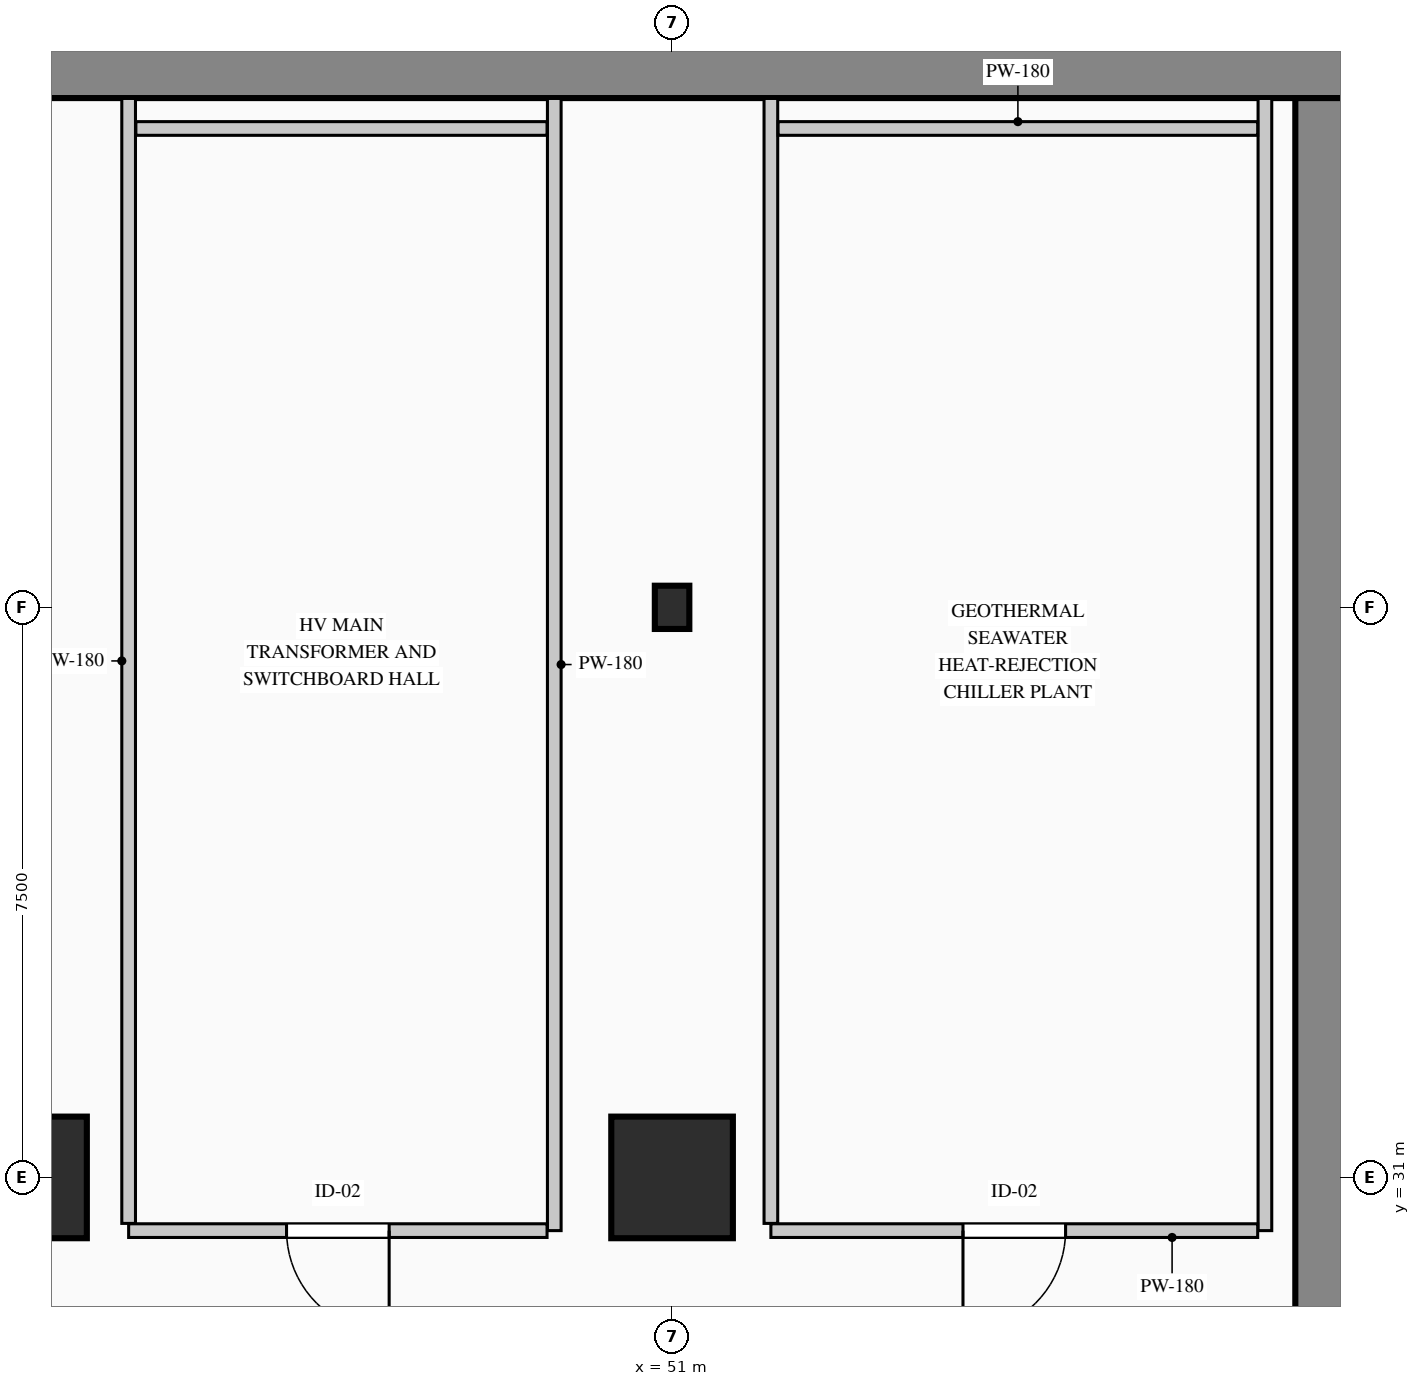
"""IFC4 building model, lengths in metres.
Left out: names, types, materials, properties, quantities, classifications, styles, units other than length and angle.
Written with IfcOpenShell. Run it as: python <this file> out.ifc"""

import sys

from ifc_helpers import new_model, si_unit, direction, frame, frame_2d, origin, origin_2d, place, context, subcontext, project, spatial, rectangle, i_section, extrude, element, fill, save


model = new_model("IFC4")
c1 = context("Model", 3, precision=1e-05, world=origin(), true_north=direction((0.0, 1.0)))
c2 = subcontext(c1, "Body", "Model", "MODEL_VIEW")
j1 = project(units=[si_unit("LENGTHUNIT", "METRE"), si_unit("PLANEANGLEUNIT", "RADIAN")], contexts=[c1])
p1 = place(None, origin())
s1 = spatial("IfcSite", under=j1, at=p1, CompositionType="ELEMENT")
p2 = place(p1, origin())
s2 = spatial("IfcBuilding", under=s1, at=p2, CompositionType="ELEMENT")
p3 = place(p2, frame((0.0, 0.0, -18.0)))
s3 = spatial("IfcBuildingStorey", under=s2, at=p3, CompositionType="ELEMENT", Elevation=-18.0)
p4 = place(p3, frame((0.0, 45.6, 0.0), z_axis=(0.0, 0.0, 1.0), x_axis=(1.0, 0.0, 0.0)))
e1 = element("IfcWall", 1, at=p4, inside=s3, PredefinedType="USERDEFINED", context=c2, shape_type="SweptSolid", body=[
    extrude(rectangle(XDim=60.0, YDim=0.8, at=frame_2d((30.0, 0.0))), origin(), (0.0, 0.0, 1.0), 4.5),
])
p5 = place(p3, frame((59.6, 0.8, 0.0), z_axis=(0.0, 0.0, 1.0), x_axis=(0.0, 1.0, 0.0)))
e2 = element("IfcWall", 2, at=p5, inside=s3, PredefinedType="USERDEFINED", context=c2, shape_type="SweptSolid", body=[
    extrude(rectangle(XDim=44.4, YDim=0.8, at=frame_2d((22.2, 0.0))), origin(), (0.0, 0.0, 1.0), 4.5),
])
for number, where, z_axis, x_axis in (
    (3, (42.5, 31.0, 0.0), (0.0, 0.0, 1.0), (1.0, 0.0, 0.0)),
    (4, (51.0, 31.0, 0.0), (0.0, 0.0, 1.0), (1.0, 0.0, 0.0)),
):
    element("IfcColumn", number, at=place(p3, frame(where, z_axis=z_axis, x_axis=x_axis)), inside=s3, PredefinedType="COLUMN", context=c2, shape_type="SweptSolid", body=[
        extrude(rectangle(XDim=1.6, YDim=1.6, at=origin_2d()), origin(), (0.0, 0.0, 1.0), 4.5),
    ])
p6 = place(p3, frame((51.0, 38.5, 0.0), z_axis=(0.0, 0.0, 1.0), x_axis=(1.0, 0.0, 0.0)))
e5 = element("IfcColumn", 5, at=p6, inside=s3, PredefinedType="COLUMN", context=c2, shape_type="SweptSolid", body=[
    extrude(i_section(OverallWidth=0.454, OverallDepth=0.569, WebThickness=0.078, FlangeThickness=0.08, FilletRadius=0.015, at=origin_2d()), origin(), (0.0, 0.0, 1.0), 4.5),
])
p7 = place(p3, frame((58.8, 45.195, 0.0), z_axis=(0.0, 0.0, 1.0), x_axis=(0.0, -1.0, 0.0)))
e6 = element("IfcWall", 6, at=p7, inside=s3, PredefinedType="PARTITIONING", context=c2, shape_type="SweptSolid", body=[
    extrude(rectangle(XDim=14.895, YDim=0.18, at=frame_2d((7.448, 0.0))), origin(), (0.0, 0.0, 1.0), 4.135),
])
p8 = place(p3, frame((58.705, 30.3, 0.0), z_axis=(0.0, 0.0, 1.0), x_axis=(-1.0, 0.0, 0.0)))
e7 = element("IfcWall", 7, at=p8, inside=s3, PredefinedType="PARTITIONING", context=c2, shape_type="SweptSolid", body=[
    extrude(rectangle(XDim=6.405, YDim=0.18, at=frame_2d((3.203, 0.0))), origin(), (0.0, 0.0, 1.0), 3.52),
])
p9 = place(p8, frame((2.528, 0.0, 0.0)))
e8 = element("IfcOpeningElement", 8, at=p9, cuts=e7, PredefinedType="OPENING", context=c2, shape_type="SweptSolid", body=[
    extrude(rectangle(XDim=1.35, YDim=2.2, at=frame_2d((0.675, 1.1))), frame((0.0, 0.1, 0.0), z_axis=(0.0, -1.0, 0.0), x_axis=(1.0, 0.0, 0.0)), (0.0, 0.0, 1.0), 0.2),
])
p10 = place(p3, frame((52.3, 30.395, 0.0), z_axis=(0.0, 0.0, 1.0), x_axis=(0.0, 1.0, 0.0)))
e9 = element("IfcWall", 9, at=p10, inside=s3, PredefinedType="PARTITIONING", context=c2, shape_type="SweptSolid", body=[
    extrude(rectangle(XDim=14.8, YDim=0.18, at=frame_2d((7.4, 0.0))), origin(), (0.0, 0.0, 1.0), 4.135),
])
p11 = place(p3, frame((52.395, 44.8, 0.0), z_axis=(0.0, 0.0, 1.0), x_axis=(1.0, 0.0, 0.0)))
e10 = element("IfcWall", 10, at=p11, inside=s3, PredefinedType="PARTITIONING", context=c2, shape_type="SweptSolid", body=[
    extrude(rectangle(XDim=6.31, YDim=0.18, at=frame_2d((3.155, 0.0))), origin(), (0.0, 0.0, 1.0), 4.135),
])
p12 = place(p3, frame((49.45, 45.195, 0.0), z_axis=(0.0, 0.0, 1.0), x_axis=(0.0, -1.0, 0.0)))
e11 = element("IfcWall", 11, at=p12, inside=s3, PredefinedType="PARTITIONING", context=c2, shape_type="SweptSolid", body=[
    extrude(rectangle(XDim=14.895, YDim=0.18, at=frame_2d((7.448, 0.0))), origin(), (0.0, 0.0, 1.0), 3.52),
])
p13 = place(p3, frame((49.355, 30.3, 0.0), z_axis=(0.0, 0.0, 1.0), x_axis=(-1.0, 0.0, 0.0)))
e12 = element("IfcWall", 12, at=p13, inside=s3, PredefinedType="PARTITIONING", context=c2, shape_type="SweptSolid", body=[
    extrude(rectangle(XDim=5.505, YDim=0.18, at=frame_2d((2.752, 0.0))), origin(), (0.0, 0.0, 1.0), 4.135),
])
p14 = place(p13, frame((2.077, 0.0, 0.0)))
e13 = element("IfcOpeningElement", 13, at=p14, cuts=e12, PredefinedType="OPENING", context=c2, shape_type="SweptSolid", body=[
    extrude(rectangle(XDim=1.35, YDim=2.2, at=frame_2d((0.675, 1.1))), frame((0.0, 0.1, 0.0), z_axis=(0.0, -1.0, 0.0), x_axis=(1.0, 0.0, 0.0)), (0.0, 0.0, 1.0), 0.2),
])
p15 = place(p3, frame((43.85, 30.395, 0.0), z_axis=(0.0, 0.0, 1.0), x_axis=(0.0, 1.0, 0.0)))
e14 = element("IfcWall", 14, at=p15, inside=s3, PredefinedType="PARTITIONING", context=c2, shape_type="SweptSolid", body=[
    extrude(rectangle(XDim=14.8, YDim=0.18, at=frame_2d((7.4, 0.0))), origin(), (0.0, 0.0, 1.0), 4.135),
])
p16 = place(p3, frame((43.945, 44.8, 0.0), z_axis=(0.0, 0.0, 1.0), x_axis=(1.0, 0.0, 0.0)))
e15 = element("IfcWall", 15, at=p16, inside=s3, PredefinedType="PARTITIONING", context=c2, shape_type="SweptSolid", body=[
    extrude(rectangle(XDim=5.41, YDim=0.18, at=frame_2d((2.705, 0.0))), origin(), (0.0, 0.0, 1.0), 4.135),
])
p17 = place(p9, origin())
e16 = element("IfcDoor", 16, at=p17, inside=s3, OperationType="SINGLE_SWING_RIGHT", PredefinedType="DOOR", context=c2, shape_type="SweptSolid", body=[
    extrude(rectangle(XDim=1.35, YDim=2.2, at=frame_2d((0.675, 1.1))), frame((0.0, 0.025, 0.0), z_axis=(0.0, -1.0, 0.0), x_axis=(1.0, 0.0, 0.0)), (0.0, 0.0, 1.0), 0.05),
])
fill(e8, e16)
p18 = place(p14, origin())
e17 = element("IfcDoor", 17, at=p18, inside=s3, OperationType="SINGLE_SWING_LEFT", PredefinedType="DOOR", context=c2, shape_type="SweptSolid", body=[
    extrude(rectangle(XDim=1.35, YDim=2.2, at=frame_2d((0.675, 1.1))), frame((0.0, 0.025, 0.0), z_axis=(0.0, -1.0, 0.0), x_axis=(1.0, 0.0, 0.0)), (0.0, 0.0, 1.0), 0.05),
])
fill(e13, e17)
save(model, sys.argv[1])
